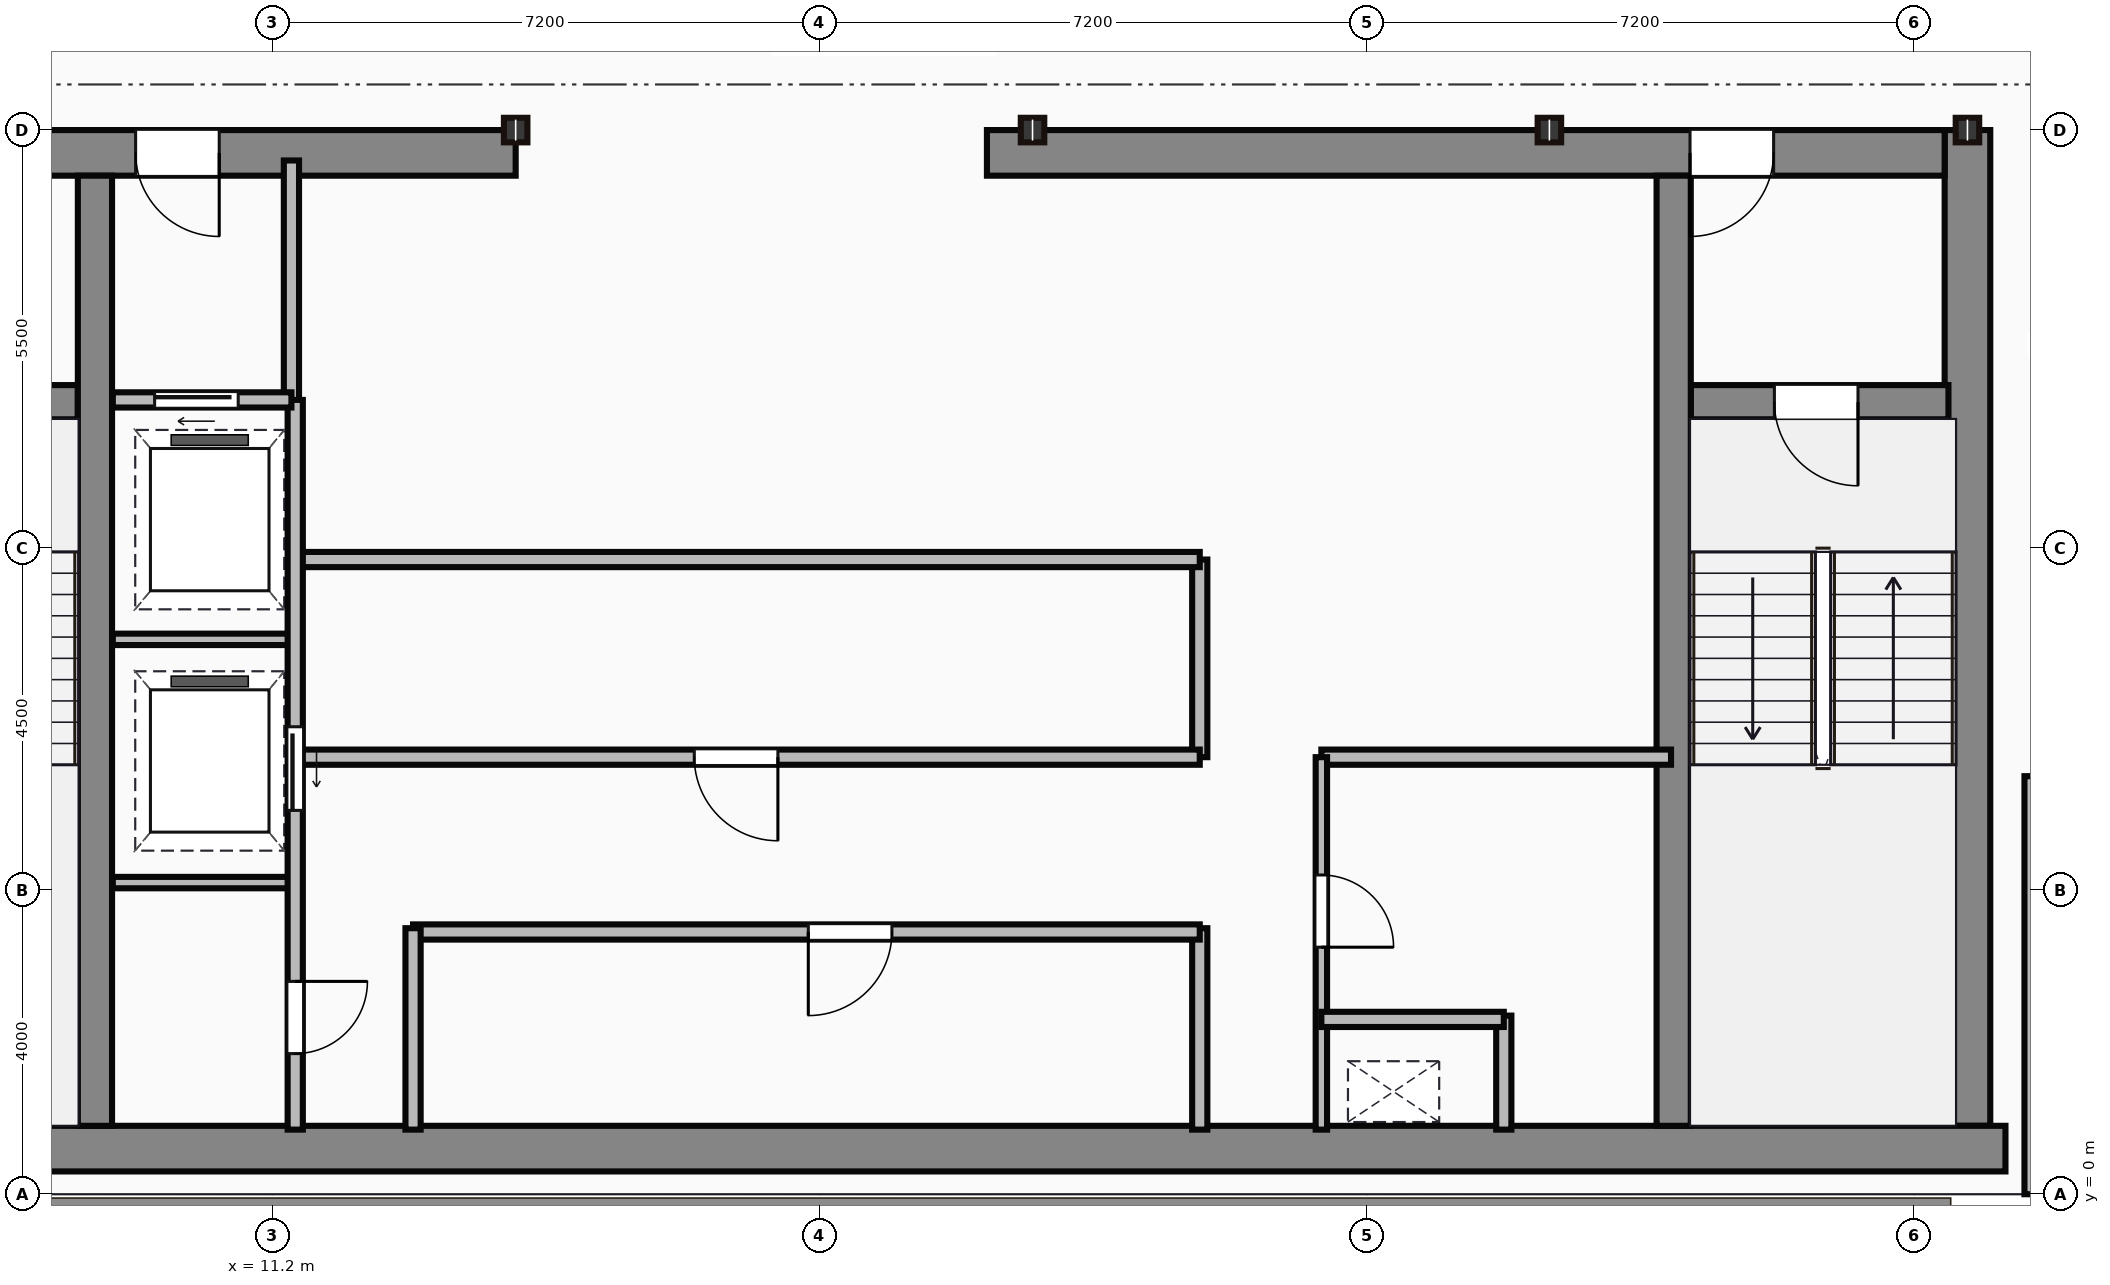
"""IFC4 building model, lengths in metres.
Left out: names, types, materials, properties, quantities, classifications, styles, units other than length and angle.
Written with IfcOpenShell. Run it as: python <this file> out.ifc"""

import sys

from ifc_helpers import new_model, si_unit, direction, frame, frame_2d, origin, origin_2d, place, context, subcontext, project, spatial, rectangle, i_section, extrude, source, transform, mapped, element, fill, save


model = new_model("IFC4")
c1 = context("Model", 3, precision=1e-05, world=origin(), true_north=direction((0.0, 1.0)))
c2 = subcontext(c1, "Body", "Model", "MODEL_VIEW")
j1 = project(units=[si_unit("LENGTHUNIT", "METRE"), si_unit("PLANEANGLEUNIT", "RADIAN")], contexts=[c1])
p1 = place(None, origin())
s1 = spatial("IfcSite", under=j1, at=p1, CompositionType="ELEMENT")
p2 = place(p1, origin())
s2 = spatial("IfcBuilding", under=s1, at=p2, CompositionType="ELEMENT")
p3 = place(p2, frame((0.0, 0.0, 299.85)))
s3 = spatial("IfcBuildingStorey", under=s2, at=p3, CompositionType="ELEMENT", Elevation=299.85)
m1 = source(origin(), c2, "Body", "SweptSolid", [
    extrude(rectangle(XDim=29.5, YDim=0.6, at=frame_2d((14.75, 0.0))), origin(), (0.0, 0.0, 1.0), 3.8),
])
p4 = place(p3, frame((4.5, 0.6, 0.0), z_axis=(0.0, 0.0, 1.0), x_axis=(1.0, 0.0, 0.0)))
e1 = element("IfcWall", 1, at=p4, inside=s3, PredefinedType="SHEAR", context=c2, shape_type="MappedRepresentation", body=[
    mapped(m1, transform((0.0, 0.0, 0.0))),
])
m2 = source(origin(), c2, "Body", "SweptSolid", [
    extrude(rectangle(XDim=13.1, YDim=0.6, at=frame_2d((6.55, 0.0))), origin(), (0.0, 0.0, 1.0), 3.8),
])
p5 = place(p3, frame((33.5, 0.9, 0.0), z_axis=(0.0, 0.0, 1.0), x_axis=(0.0, 1.0, 0.0)))
e2 = element("IfcWall", 2, at=p5, inside=s3, PredefinedType="SHEAR", context=c2, shape_type="MappedRepresentation", body=[
    mapped(m2, transform((0.0, 0.0, 0.0))),
])
m3 = source(origin(), c2, "Body", "SweptSolid", [
    extrude(rectangle(XDim=9.1, YDim=0.6, at=frame_2d((4.55, 0.0))), origin(), (0.0, 0.0, 1.0), 3.8),
])
p6 = place(p3, frame((5.3, 13.7, 0.0), z_axis=(0.0, 0.0, 1.0), x_axis=(1.0, 0.0, 0.0)))
e3 = element("IfcWall", 3, at=p6, inside=s3, PredefinedType="SHEAR", context=c2, shape_type="MappedRepresentation", body=[
    mapped(m3, transform((0.0, 0.0, 0.0))),
])
p7 = place(p6, frame((4.1, 0.0, 0.0)))
e4 = element("IfcOpeningElement", 4, at=p7, cuts=e3, PredefinedType="OPENING", context=c2, shape_type="SweptSolid", body=[
    extrude(rectangle(XDim=1.1, YDim=2.15, at=frame_2d((0.55, 1.075))), frame((0.0, 0.31, 0.0), z_axis=(0.0, -1.0, 0.0), x_axis=(1.0, 0.0, 0.0)), (0.0, 0.0, 1.0), 0.62),
])
m4 = source(origin(), c2, "Body", "SweptSolid", [
    extrude(rectangle(XDim=12.6, YDim=0.6, at=frame_2d((6.3, 0.0))), origin(), (0.0, 0.0, 1.0), 3.8),
])
p8 = place(p3, frame((20.6, 13.7, 0.0), z_axis=(0.0, 0.0, 1.0), x_axis=(1.0, 0.0, 0.0)))
e5 = element("IfcWall", 5, at=p8, inside=s3, PredefinedType="SHEAR", context=c2, shape_type="MappedRepresentation", body=[
    mapped(m4, transform((0.0, 0.0, 0.0))),
])
p9 = place(p8, frame((9.25, 0.0, 0.0)))
e6 = element("IfcOpeningElement", 6, at=p9, cuts=e5, PredefinedType="OPENING", context=c2, shape_type="SweptSolid", body=[
    extrude(rectangle(XDim=1.1, YDim=2.15, at=frame_2d((0.55, 1.075))), frame((0.0, 0.31, 0.0), z_axis=(0.0, -1.0, 0.0), x_axis=(1.0, 0.0, 0.0)), (0.0, 0.0, 1.0), 0.62),
])
m5 = source(origin(), c2, "Body", "SweptSolid", [
    extrude(rectangle(XDim=12.5, YDim=0.45, at=frame_2d((6.25, 0.0))), origin(), (0.0, 0.0, 1.0), 3.8),
])
for number, where, z_axis, x_axis in (
    (7, (8.865, 0.9, 0.0), (0.0, 0.0, 1.0), (0.0, 1.0, 0.0)),
    (8, (29.635, 0.9, 0.0), (0.0, 0.0, 1.0), (0.0, 1.0, 0.0)),
):
    element("IfcWall", number, at=place(p3, frame(where, z_axis=z_axis, x_axis=x_axis)), inside=s3, PredefinedType="SHEAR", context=c2, shape_type="MappedRepresentation", body=[
        mapped(m5, transform((0.0, 0.0, 0.0))),
    ])
m6 = source(origin(), c2, "Body", "SweptSolid", [
    extrude(rectangle(XDim=3.39, YDim=0.45, at=frame_2d((1.695, 0.0))), origin(), (0.0, 0.0, 1.0), 3.8),
])
p10 = place(p3, frame((5.25, 10.42, 0.0), z_axis=(0.0, 0.0, 1.0), x_axis=(1.0, 0.0, 0.0)))
e9 = element("IfcWall", 9, at=p10, inside=s3, PredefinedType="SHEAR", context=c2, shape_type="MappedRepresentation", body=[
    mapped(m6, transform((0.0, 0.0, 0.0))),
])
p11 = place(p10, frame((1.05, 0.0, 0.0)))
e10 = element("IfcOpeningElement", 10, at=p11, cuts=e9, PredefinedType="OPENING", context=c2, shape_type="SweptSolid", body=[
    extrude(rectangle(XDim=1.1, YDim=2.15, at=frame_2d((0.55, 1.075))), frame((0.0, 0.235, 0.0), z_axis=(0.0, -1.0, 0.0), x_axis=(1.0, 0.0, 0.0)), (0.0, 0.0, 1.0), 0.47),
])
p12 = place(p3, frame((29.86, 10.42, 0.0), z_axis=(0.0, 0.0, 1.0), x_axis=(1.0, 0.0, 0.0)))
e11 = element("IfcWall", 11, at=p12, inside=s3, PredefinedType="SHEAR", context=c2, shape_type="MappedRepresentation", body=[
    mapped(m6, transform((0.0, 0.0, 0.0))),
])
p13 = place(p12, frame((1.1, 0.0, 0.0)))
e12 = element("IfcOpeningElement", 12, at=p13, cuts=e11, PredefinedType="OPENING", context=c2, shape_type="SweptSolid", body=[
    extrude(rectangle(XDim=1.1, YDim=2.15, at=frame_2d((0.55, 1.075))), frame((0.0, 0.235, 0.0), z_axis=(0.0, -1.0, 0.0), x_axis=(1.0, 0.0, 0.0)), (0.0, 0.0, 1.0), 0.47),
])
m7 = source(origin(), c2, "Body", "SweptSolid", [
    extrude(i_section(OverallWidth=0.309, OverallDepth=0.323, WebThickness=0.014, FlangeThickness=0.023, at=origin_2d()), origin(), (0.0, 0.0, 1.0), 3.8),
])
for number, where, z_axis, x_axis in (
    (13, (14.4, 14.0, 0.0), (0.0, 0.0, 1.0), (1.0, 0.0, 0.0)),
    (14, (21.2, 14.0, 0.0), (0.0, 0.0, 1.0), (1.0, 0.0, 0.0)),
    (15, (28.0, 14.0, 0.0), (0.0, 0.0, 1.0), (1.0, 0.0, 0.0)),
    (16, (33.5, 14.0, 0.0), (0.0, 0.0, 1.0), (1.0, 0.0, 0.0)),
):
    element("IfcColumn", number, at=place(p3, frame(where, z_axis=z_axis, x_axis=x_axis)), inside=s3, PredefinedType="COLUMN", context=c2, shape_type="MappedRepresentation", body=[
        mapped(m7, transform((0.0, 0.0, 0.0))),
    ])
m8 = source(origin(), c2, "Body", "SweptSolid", [
    extrude(rectangle(XDim=5.5, YDim=0.25, at=frame_2d((2.75, 0.0))), origin(), (0.0, 0.0, 1.0), 3.5),
])
p14 = place(p3, frame((34.375, 0.0, 0.0), z_axis=(0.0, 0.0, 1.0), x_axis=(0.0, 1.0, 0.0)))
e17 = element("IfcWall", 17, at=p14, inside=s3, PredefinedType="STANDARD", context=c2, shape_type="MappedRepresentation", body=[
    mapped(m8, transform((0.0, 0.0, 0.0))),
])
m9 = source(origin(), c2, "Body", "SweptSolid", [
    extrude(rectangle(XDim=3.18, YDim=0.2, at=frame_2d((1.59, 0.0))), origin(), (0.0, 0.0, 1.0), 3.5),
])
p15 = place(p3, frame((11.45, 10.42, 0.0), z_axis=(0.0, 0.0, 1.0), x_axis=(0.0, 1.0, 0.0)))
e18 = element("IfcWall", 18, at=p15, inside=s3, PredefinedType="PARTITIONING", context=c2, shape_type="MappedRepresentation", body=[
    mapped(m9, transform((0.0, 0.0, 0.0))),
])
m10 = source(origin(), c2, "Body", "SweptSolid", [
    extrude(rectangle(XDim=2.35, YDim=0.2, at=frame_2d((1.175, 0.0))), origin(), (0.0, 0.0, 1.0), 3.5),
])
p16 = place(p3, frame((9.1, 10.45, 0.0), z_axis=(0.0, 0.0, 1.0), x_axis=(1.0, 0.0, 0.0)))
e19 = element("IfcWall", 19, at=p16, inside=s3, PredefinedType="PARTITIONING", context=c2, shape_type="MappedRepresentation", body=[
    mapped(m10, transform((0.0, 0.0, 0.0))),
])
p17 = place(p16, frame((0.55, 0.0, 0.0)))
e20 = element("IfcOpeningElement", 20, at=p17, cuts=e19, PredefinedType="OPENING", context=c2, shape_type="SweptSolid", body=[
    extrude(rectangle(XDim=1.1, YDim=2.15, at=frame_2d((0.55, 1.075))), frame((0.0, 0.11, 0.0), z_axis=(0.0, -1.0, 0.0), x_axis=(1.0, 0.0, 0.0)), (0.0, 0.0, 1.0), 0.22),
])
m11 = source(origin(), c2, "Body", "SweptSolid", [
    extrude(rectangle(XDim=9.6, YDim=0.2, at=frame_2d((4.8, 0.0))), origin(), (0.0, 0.0, 1.0), 3.5),
])
p18 = place(p3, frame((11.5, 0.85, 0.0), z_axis=(0.0, 0.0, 1.0), x_axis=(0.0, 1.0, 0.0)))
e21 = element("IfcWall", 21, at=p18, inside=s3, PredefinedType="PARTITIONING", context=c2, shape_type="MappedRepresentation", body=[
    mapped(m11, transform((0.0, 0.0, 0.0))),
])
p19 = place(p18, frame((4.2, 0.0, 0.0)))
e22 = element("IfcOpeningElement", 22, at=p19, cuts=e21, PredefinedType="OPENING", context=c2, shape_type="SweptSolid", body=[
    extrude(rectangle(XDim=1.1, YDim=2.15, at=frame_2d((0.55, 1.075))), frame((0.0, 0.11, 0.0), z_axis=(0.0, -1.0, 0.0), x_axis=(1.0, 0.0, 0.0)), (0.0, 0.0, 1.0), 0.22),
])
p20 = place(p18, frame((1.0, 0.0, 0.0)))
e23 = element("IfcOpeningElement", 23, at=p20, cuts=e21, PredefinedType="OPENING", context=c2, shape_type="SweptSolid", body=[
    extrude(rectangle(XDim=0.95, YDim=2.15, at=frame_2d((0.475, 1.075))), frame((0.0, 0.11, 0.0), z_axis=(0.0, -1.0, 0.0), x_axis=(1.0, 0.0, 0.0)), (0.0, 0.0, 1.0), 0.22),
])
m12 = source(origin(), c2, "Body", "SweptSolid", [
    extrude(rectangle(XDim=2.4, YDim=0.15, at=frame_2d((1.2, 0.0))), origin(), (0.0, 0.0, 1.0), 3.5),
])
for number, where, z_axis, x_axis in (
    (24, (9.1, 4.1, 0.0), (0.0, 0.0, 1.0), (1.0, 0.0, 0.0)),
    (25, (9.1, 7.3, 0.0), (0.0, 0.0, 1.0), (1.0, 0.0, 0.0)),
):
    element("IfcWall", number, at=place(p3, frame(where, z_axis=z_axis, x_axis=x_axis)), inside=s3, PredefinedType="PARTITIONING", context=c2, shape_type="MappedRepresentation", body=[
        mapped(m12, transform((0.0, 0.0, 0.0))),
    ])
m13 = source(origin(), c2, "Body", "SweptSolid", [
    extrude(rectangle(XDim=2.65, YDim=0.2, at=frame_2d((1.325, 0.0))), origin(), (0.0, 0.0, 1.0), 3.5),
])
p21 = place(p3, frame((13.05, 0.85, 0.0), z_axis=(0.0, 0.0, 1.0), x_axis=(0.0, 1.0, 0.0)))
e26 = element("IfcWall", 26, at=p21, inside=s3, PredefinedType="PARTITIONING", context=c2, shape_type="MappedRepresentation", body=[
    mapped(m13, transform((0.0, 0.0, 0.0))),
])
m14 = source(origin(), c2, "Body", "SweptSolid", [
    extrude(rectangle(XDim=10.35, YDim=0.2, at=frame_2d((5.175, 0.0))), origin(), (0.0, 0.0, 1.0), 3.5),
])
p22 = place(p3, frame((13.05, 3.45, 0.0), z_axis=(0.0, 0.0, 1.0), x_axis=(1.0, 0.0, 0.0)))
e27 = element("IfcWall", 27, at=p22, inside=s3, PredefinedType="PARTITIONING", context=c2, shape_type="MappedRepresentation", body=[
    mapped(m14, transform((0.0, 0.0, 0.0))),
])
p23 = place(p22, frame((5.2, 0.0, 0.0)))
e28 = element("IfcOpeningElement", 28, at=p23, cuts=e27, PredefinedType="OPENING", context=c2, shape_type="SweptSolid", body=[
    extrude(rectangle(XDim=1.1, YDim=2.15, at=frame_2d((0.55, 1.075))), frame((0.0, 0.11, 0.0), z_axis=(0.0, -1.0, 0.0), x_axis=(1.0, 0.0, 0.0)), (0.0, 0.0, 1.0), 0.22),
])
p24 = place(p3, frame((23.4, 0.85, 0.0), z_axis=(0.0, 0.0, 1.0), x_axis=(0.0, 1.0, 0.0)))
e29 = element("IfcWall", 29, at=p24, inside=s3, PredefinedType="PARTITIONING", context=c2, shape_type="MappedRepresentation", body=[
    mapped(m13, transform((0.0, 0.0, 0.0))),
])
m15 = source(origin(), c2, "Body", "SweptSolid", [
    extrude(rectangle(XDim=11.85, YDim=0.2, at=frame_2d((5.925, 0.0))), origin(), (0.0, 0.0, 1.0), 3.5),
])
p25 = place(p3, frame((11.55, 5.75, 0.0), z_axis=(0.0, 0.0, 1.0), x_axis=(1.0, 0.0, 0.0)))
e30 = element("IfcWall", 30, at=p25, inside=s3, PredefinedType="PARTITIONING", context=c2, shape_type="MappedRepresentation", body=[
    mapped(m15, transform((0.0, 0.0, 0.0))),
])
p26 = place(p25, frame((5.2, 0.0, 0.0)))
e31 = element("IfcOpeningElement", 31, at=p26, cuts=e30, PredefinedType="OPENING", context=c2, shape_type="SweptSolid", body=[
    extrude(rectangle(XDim=1.1, YDim=2.15, at=frame_2d((0.55, 1.075))), frame((0.0, 0.11, 0.0), z_axis=(0.0, -1.0, 0.0), x_axis=(1.0, 0.0, 0.0)), (0.0, 0.0, 1.0), 0.22),
])
p27 = place(p3, frame((11.55, 8.35, 0.0), z_axis=(0.0, 0.0, 1.0), x_axis=(1.0, 0.0, 0.0)))
e32 = element("IfcWall", 32, at=p27, inside=s3, PredefinedType="PARTITIONING", context=c2, shape_type="MappedRepresentation", body=[
    mapped(m15, transform((0.0, 0.0, 0.0))),
])
m16 = source(origin(), c2, "Body", "SweptSolid", [
    extrude(rectangle(XDim=2.6, YDim=0.2, at=frame_2d((1.3, 0.0))), origin(), (0.0, 0.0, 1.0), 3.5),
])
p28 = place(p3, frame((23.4, 5.75, 0.0), z_axis=(0.0, 0.0, 1.0), x_axis=(0.0, 1.0, 0.0)))
e33 = element("IfcWall", 33, at=p28, inside=s3, PredefinedType="PARTITIONING", context=c2, shape_type="MappedRepresentation", body=[
    mapped(m16, transform((0.0, 0.0, 0.0))),
])
m17 = source(origin(), c2, "Body", "SweptSolid", [
    extrude(rectangle(XDim=4.9, YDim=0.15, at=frame_2d((2.45, 0.0))), origin(), (0.0, 0.0, 1.0), 3.5),
])
p29 = place(p3, frame((25.0, 0.85, 0.0), z_axis=(0.0, 0.0, 1.0), x_axis=(0.0, 1.0, 0.0)))
e34 = element("IfcWall", 34, at=p29, inside=s3, PredefinedType="PARTITIONING", context=c2, shape_type="MappedRepresentation", body=[
    mapped(m17, transform((0.0, 0.0, 0.0))),
])
p30 = place(p29, frame((2.4, 0.0, 0.0)))
e35 = element("IfcOpeningElement", 35, at=p30, cuts=e34, PredefinedType="OPENING", context=c2, shape_type="SweptSolid", body=[
    extrude(rectangle(XDim=0.95, YDim=2.15, at=frame_2d((0.475, 1.075))), frame((0.0, 0.085, 0.0), z_axis=(0.0, -1.0, 0.0), x_axis=(1.0, 0.0, 0.0)), (0.0, 0.0, 1.0), 0.17),
])
m18 = source(origin(), c2, "Body", "SweptSolid", [
    extrude(rectangle(XDim=4.6, YDim=0.2, at=frame_2d((2.3, 0.0))), origin(), (0.0, 0.0, 1.0), 3.5),
])
p31 = place(p3, frame((25.0, 5.75, 0.0), z_axis=(0.0, 0.0, 1.0), x_axis=(1.0, 0.0, 0.0)))
e36 = element("IfcWall", 36, at=p31, inside=s3, PredefinedType="PARTITIONING", context=c2, shape_type="MappedRepresentation", body=[
    mapped(m18, transform((0.0, 0.0, 0.0))),
])
m19 = source(origin(), c2, "Body", "SweptSolid", [
    extrude(rectangle(XDim=2.4, YDim=0.2, at=frame_2d((1.2, 0.0))), origin(), (0.0, 0.0, 1.0), 3.5),
])
p32 = place(p3, frame((25.0, 2.3, 0.0), z_axis=(0.0, 0.0, 1.0), x_axis=(1.0, 0.0, 0.0)))
e37 = element("IfcWall", 37, at=p32, inside=s3, PredefinedType="PARTITIONING", context=c2, shape_type="MappedRepresentation", body=[
    mapped(m19, transform((0.0, 0.0, 0.0))),
])
m20 = source(origin(), c2, "Body", "SweptSolid", [
    extrude(rectangle(XDim=1.5, YDim=0.2, at=frame_2d((0.75, 0.0))), origin(), (0.0, 0.0, 1.0), 3.5),
])
p33 = place(p3, frame((27.4, 0.85, 0.0), z_axis=(0.0, 0.0, 1.0), x_axis=(0.0, 1.0, 0.0)))
e38 = element("IfcWall", 38, at=p33, inside=s3, PredefinedType="PARTITIONING", context=c2, shape_type="MappedRepresentation", body=[
    mapped(m20, transform((0.0, 0.0, 0.0))),
])
m21 = source(origin(), c2, "Body", "SweptSolid", [
    extrude(rectangle(XDim=1.1, YDim=2.15, at=frame_2d((0.55, 1.075))), frame((0.0, 0.025, 0.0), z_axis=(0.0, -1.0, 0.0), x_axis=(1.0, 0.0, 0.0)), (0.0, 0.0, 1.0), 0.05),
])
p34 = place(p13, frame((1.1, 0.0, 0.0), z_axis=(0.0, 0.0, 1.0), x_axis=(-1.0, 0.0, 0.0)))
e39 = element("IfcDoor", 39, at=p34, inside=s3, OperationType="SINGLE_SWING_RIGHT", PredefinedType="DOOR", context=c2, shape_type="MappedRepresentation", body=[
    mapped(m21, transform((0.0, 0.0, 0.0))),
])
fill(e12, e39)
p35 = place(p7, origin())
e40 = element("IfcDoor", 40, at=p35, inside=s3, OperationType="SINGLE_SWING_RIGHT", PredefinedType="DOOR", context=c2, shape_type="MappedRepresentation", body=[
    mapped(m21, transform((0.0, 0.0, 0.0))),
])
fill(e4, e40)
p36 = place(p9, origin())
e41 = element("IfcDoor", 41, at=p36, inside=s3, OperationType="SINGLE_SWING_LEFT", PredefinedType="DOOR", context=c2, shape_type="MappedRepresentation", body=[
    mapped(m21, transform((0.0, 0.0, 0.0))),
])
fill(e6, e41)
p37 = place(p17, origin())
e42 = element("IfcDoor", 42, at=p37, inside=s3, OperationType="SLIDING_TO_LEFT", PredefinedType="DOOR", context=c2, shape_type="MappedRepresentation", body=[
    mapped(m21, transform((0.0, 0.0, 0.0))),
])
fill(e20, e42)
p38 = place(p19, frame((1.1, 0.0, 0.0), z_axis=(0.0, 0.0, 1.0), x_axis=(-1.0, 0.0, 0.0)))
e43 = element("IfcDoor", 43, at=p38, inside=s3, OperationType="SLIDING_TO_LEFT", PredefinedType="DOOR", context=c2, shape_type="MappedRepresentation", body=[
    mapped(m21, transform((0.0, 0.0, 0.0))),
])
fill(e22, e43)
m22 = source(origin(), c2, "Body", "SweptSolid", [
    extrude(rectangle(XDim=0.95, YDim=2.15, at=frame_2d((0.475, 1.075))), frame((0.0, 0.025, 0.0), z_axis=(0.0, -1.0, 0.0), x_axis=(1.0, 0.0, 0.0)), (0.0, 0.0, 1.0), 0.05),
])
p39 = place(p20, frame((0.95, 0.0, 0.0), z_axis=(0.0, 0.0, 1.0), x_axis=(-1.0, 0.0, 0.0)))
e44 = element("IfcDoor", 44, at=p39, inside=s3, OperationType="SINGLE_SWING_RIGHT", PredefinedType="DOOR", context=c2, shape_type="MappedRepresentation", body=[
    mapped(m22, transform((0.0, 0.0, 0.0))),
])
fill(e23, e44)
p40 = place(p23, origin())
e45 = element("IfcDoor", 45, at=p40, inside=s3, OperationType="SINGLE_SWING_LEFT", PredefinedType="DOOR", context=c2, shape_type="MappedRepresentation", body=[
    mapped(m21, transform((0.0, 0.0, 0.0))),
])
fill(e28, e45)
p41 = place(p26, frame((1.1, 0.0, 0.0), z_axis=(0.0, 0.0, 1.0), x_axis=(-1.0, 0.0, 0.0)))
e46 = element("IfcDoor", 46, at=p41, inside=s3, OperationType="SINGLE_SWING_RIGHT", PredefinedType="DOOR", context=c2, shape_type="MappedRepresentation", body=[
    mapped(m21, transform((0.0, 0.0, 0.0))),
])
fill(e31, e46)
p42 = place(p30, origin())
e47 = element("IfcDoor", 47, at=p42, inside=s3, OperationType="SINGLE_SWING_LEFT", PredefinedType="DOOR", context=c2, shape_type="MappedRepresentation", body=[
    mapped(m22, transform((0.0, 0.0, 0.0))),
])
fill(e35, e47)
save(model, sys.argv[1])
